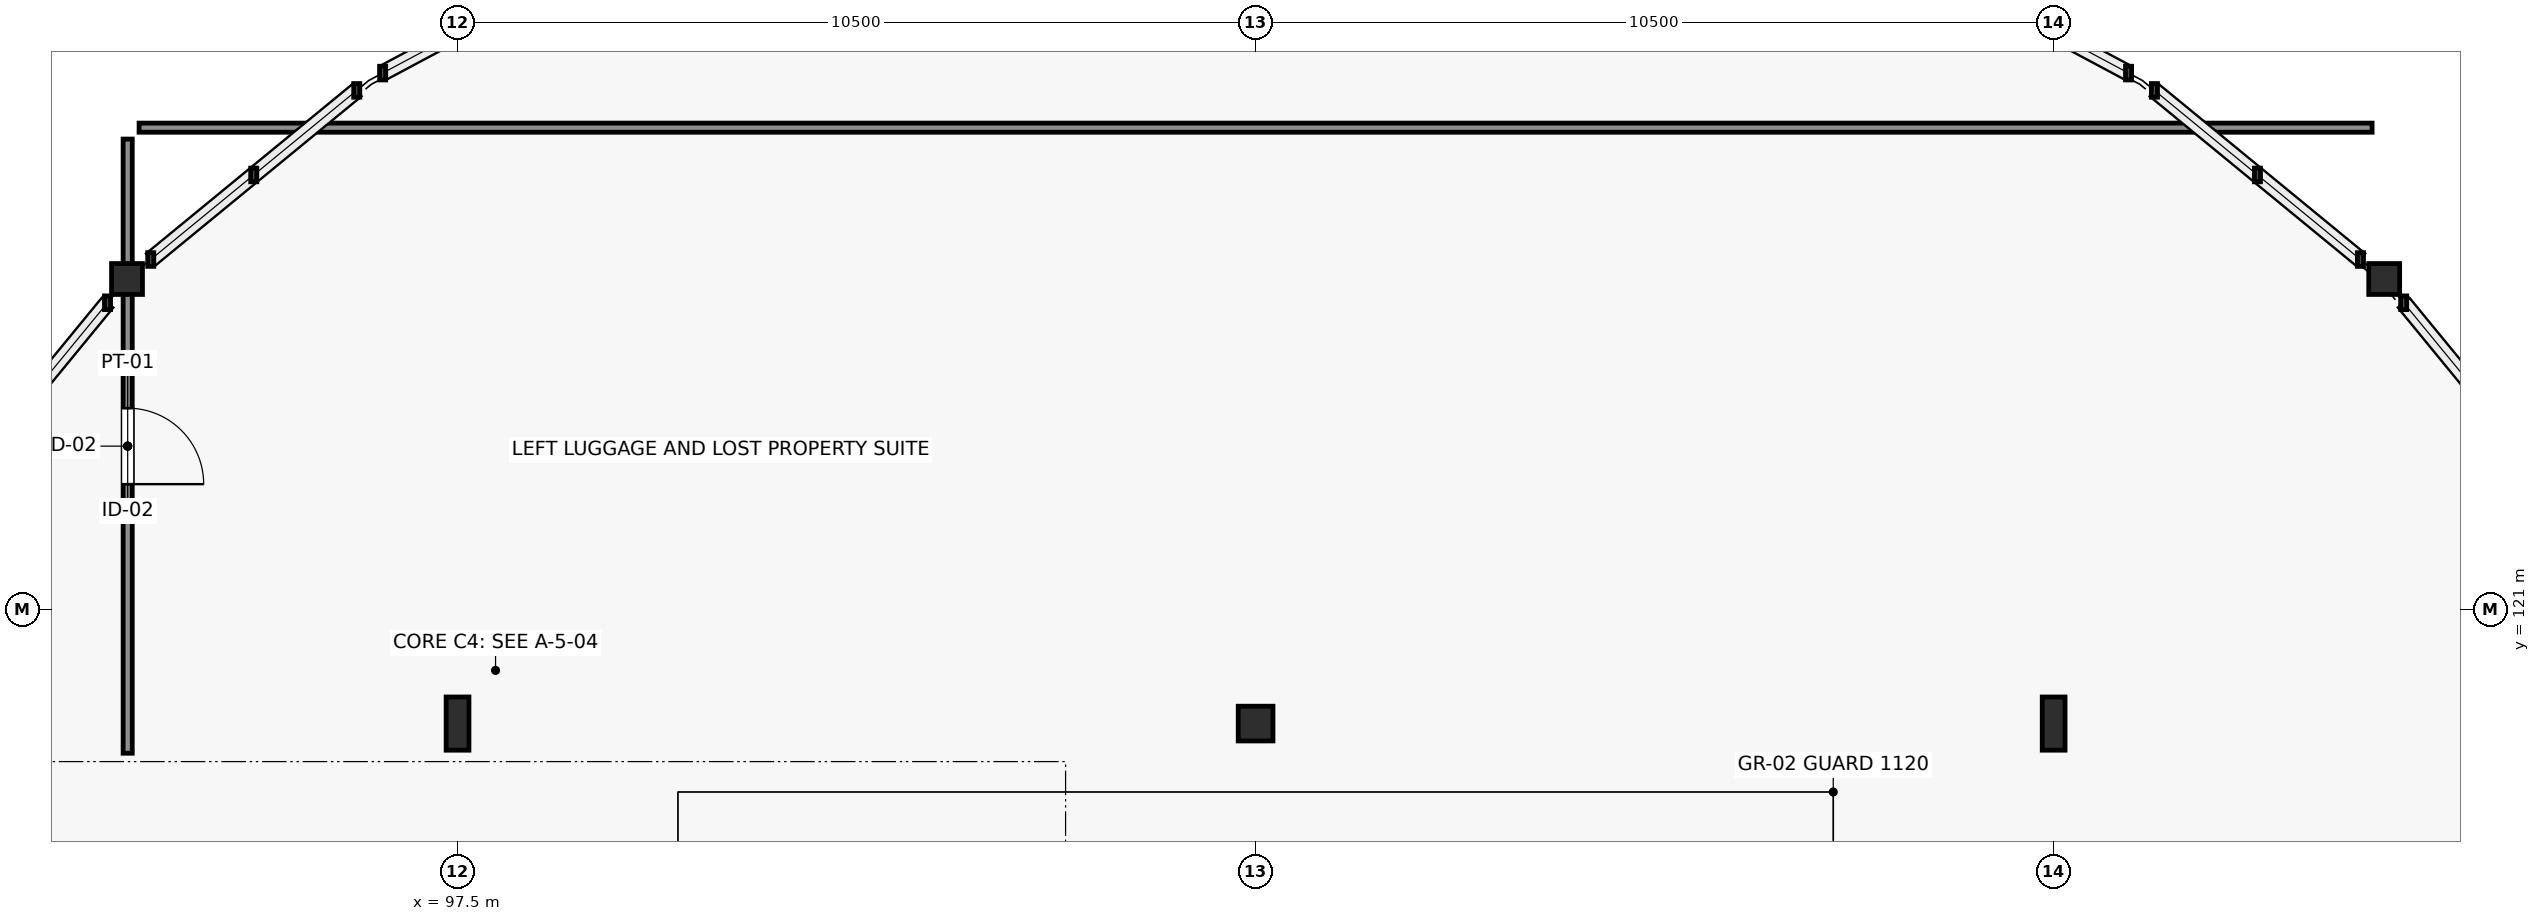
"""IFC4 building model, lengths in metres.
Left out: names, types, materials, properties, quantities, classifications, styles, units other than length and angle.
Written with IfcOpenShell. Run it as: python <this file> out.ifc"""

import sys

from ifc_helpers import new_model, si_unit, direction, frame, frame_2d, origin, origin_2d, place, context, subcontext, project, spatial, rectangle, hollow_circle, i_section, extrude, element, fill, save


model = new_model("IFC4")
c1 = context("Model", 3, precision=1e-05, world=origin(), true_north=direction((0.0, 1.0)))
c2 = subcontext(c1, "Body", "Model", "MODEL_VIEW")
j1 = project(units=[si_unit("LENGTHUNIT", "METRE"), si_unit("PLANEANGLEUNIT", "RADIAN")], contexts=[c1])
p1 = place(None, origin())
s1 = spatial("IfcSite", under=j1, at=p1, CompositionType="ELEMENT")
p2 = place(p1, origin())
s2 = spatial("IfcBuilding", under=s1, at=p2, CompositionType="ELEMENT")
p3 = place(p2, frame((0.0, 0.0, 15.0)))
s3 = spatial("IfcBuildingStorey", under=s2, at=p3, CompositionType="ELEMENT", Elevation=15.0)
for number, where, z_axis, x_axis in (
    (1, (93.151, 125.349, 0.0), (0.0, 0.0, 1.0), (1.0, 0.0, 0.0)),
    (2, (122.849, 125.349, 0.0), (0.0, 0.0, 1.0), (1.0, 0.0, 0.0)),
):
    element("IfcColumn", number, at=place(p3, frame(where, z_axis=z_axis, x_axis=x_axis)), inside=s3, PredefinedType="COLUMN", context=c2, shape_type="SweptSolid", body=[
        extrude(hollow_circle(Radius=0.203, WallThickness=0.02, at=origin_2d()), origin(), (0.0, 0.0, 1.0), 4.31),
    ])
p4 = place(p3, frame((97.5, 119.5, 0.0), z_axis=(0.0, 0.0, 1.0), x_axis=(1.0, 0.0, 0.0)))
e3 = element("IfcColumn", 3, at=p4, inside=s3, PredefinedType="COLUMN", context=c2, shape_type="SweptSolid", body=[
    extrude(i_section(OverallWidth=0.3, OverallDepth=0.7, WebThickness=0.017, FlangeThickness=0.032, FilletRadius=0.027, at=origin_2d()), origin(), (0.0, 0.0, 1.0), 4.325),
])
p5 = place(p3, frame((108.0, 119.5, 0.0), z_axis=(0.0, 0.0, 1.0), x_axis=(1.0, 0.0, 0.0)))
e4 = element("IfcColumn", 4, at=p5, inside=s3, PredefinedType="COLUMN", context=c2, shape_type="SweptSolid", body=[
    extrude(hollow_circle(Radius=0.229, WallThickness=0.02, at=origin_2d()), origin(), (0.0, 0.0, 1.0), 4.325),
])
p6 = place(p3, frame((118.5, 119.5, 0.0), z_axis=(0.0, 0.0, 1.0), x_axis=(1.0, 0.0, 0.0)))
e5 = element("IfcColumn", 5, at=p6, inside=s3, PredefinedType="COLUMN", context=c2, shape_type="SweptSolid", body=[
    extrude(i_section(OverallWidth=0.3, OverallDepth=0.7, WebThickness=0.017, FlangeThickness=0.032, FilletRadius=0.027, at=origin_2d()), origin(), (0.0, 0.0, 1.0), 4.325),
])
p7 = place(p3, frame((93.16, 127.19, 0.0), z_axis=(0.0, 0.0, 1.0), x_axis=(0.0, -1.0, 0.0)))
e6 = element("IfcWall", 6, at=p7, inside=s3, PredefinedType="PARTITIONING", context=c2, shape_type="SweptSolid", body=[
    extrude(rectangle(XDim=8.08, YDim=0.12, at=frame_2d((4.04, 0.0))), origin(), (0.0, 0.0, 1.0), 3.845),
])
p8 = place(p7, frame((3.54, 0.0, 0.0)))
e7 = element("IfcOpeningElement", 7, at=p8, cuts=e6, PredefinedType="OPENING", context=c2, shape_type="SweptSolid", body=[
    extrude(rectangle(XDim=1.0, YDim=2.15, at=frame_2d((0.5, 1.075))), frame((0.0, 0.07, 0.0), z_axis=(0.0, -1.0, 0.0), x_axis=(1.0, 0.0, 0.0)), (0.0, 0.0, 1.0), 0.14),
])
p9 = place(p3, frame((93.31, 127.34, 0.0), z_axis=(0.0, 0.0, 1.0), x_axis=(1.0, 0.0, 0.0)))
e8 = element("IfcWall", 8, at=p9, inside=s3, PredefinedType="PARTITIONING", context=c2, shape_type="SweptSolid", body=[
    extrude(rectangle(XDim=29.38, YDim=0.12, at=frame_2d((14.69, 0.0))), origin(), (0.0, 0.0, 1.0), 3.845),
])
p10 = place(p8, origin())
e9 = element("IfcDoor", 9, at=p10, inside=s3, OperationType="SINGLE_SWING_RIGHT", PredefinedType="DOOR", context=c2, shape_type="SweptSolid", body=[
    extrude(rectangle(XDim=1.0, YDim=2.15, at=frame_2d((0.5, 1.075))), frame((0.0, 0.025, 0.0), z_axis=(0.0, -1.0, 0.0), x_axis=(1.0, 0.0, 0.0)), (0.0, 0.0, 1.0), 0.05),
])
fill(e7, e9)
save(model, sys.argv[1])
